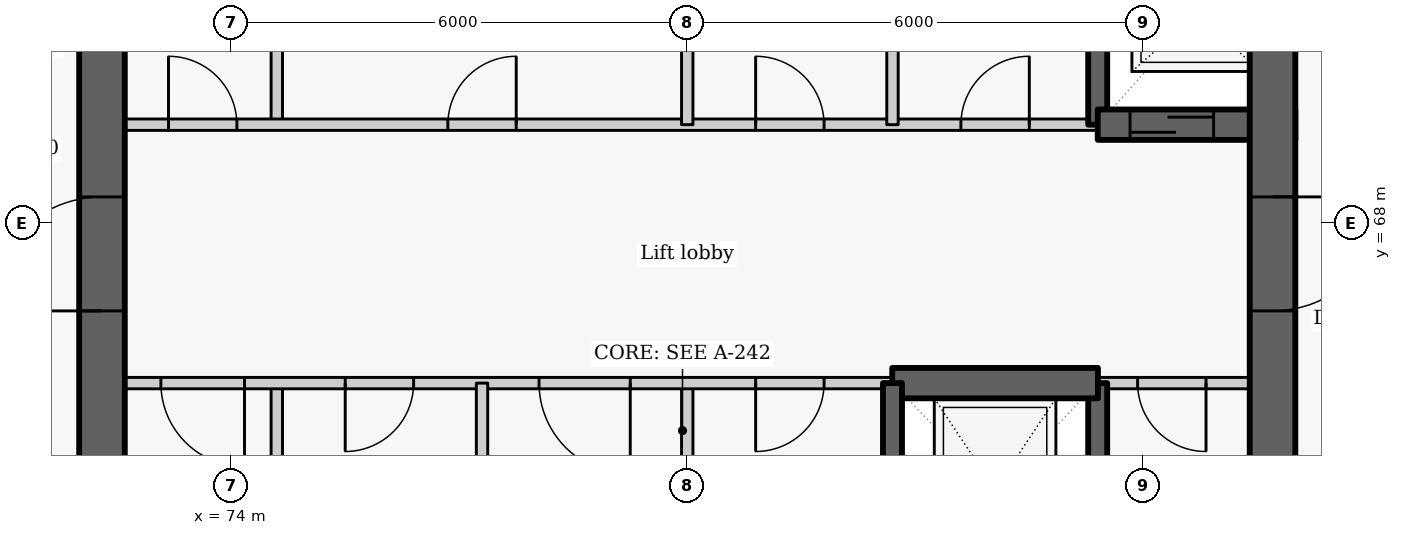
"""IFC4 building model, lengths in metres.
Left out: names, types, materials, properties, quantities, classifications, styles, units other than length and angle.
Written with IfcOpenShell. Run it as: python <this file> out.ifc"""

import sys

from ifc_helpers import new_model, si_unit, direction, frame, frame_2d, origin, place, context, subcontext, project, spatial, rectangle, extrude, element, fill, save


model = new_model("IFC4")
c1 = context("Model", 3, precision=1e-05, world=origin(), true_north=direction((0.0, 1.0)))
c2 = subcontext(c1, "Body", "Model", "MODEL_VIEW")
j1 = project(units=[si_unit("LENGTHUNIT", "METRE"), si_unit("PLANEANGLEUNIT", "RADIAN")], contexts=[c1])
p1 = place(None, origin())
s1 = spatial("IfcSite", under=j1, at=p1, CompositionType="ELEMENT")
p2 = place(p1, origin())
s2 = spatial("IfcBuilding", under=s1, at=p2, CompositionType="ELEMENT")
p3 = place(p2, frame((0.0, 0.0, 249.3)))
s3 = spatial("IfcBuildingStorey", under=s2, at=p3, CompositionType="ELEMENT", Elevation=249.3)
p4 = place(p3, frame((74.6, 63.1, 0.0), z_axis=(0.0, 0.0, 1.0), x_axis=(0.0, 1.0, 0.0)))
e1 = element("IfcWall", 1, at=p4, inside=s3, PredefinedType="PARTITIONING", context=c2, shape_type="SweptSolid", body=[
    extrude(rectangle(XDim=2.8, YDim=0.15, at=frame_2d((1.4, 0.0))), origin(), (0.0, 0.0, 1.0), 3.025),
])
p5 = place(p3, frame((74.6, 69.3, 0.0), z_axis=(0.0, 0.0, 1.0), x_axis=(0.0, 1.0, 0.0)))
e2 = element("IfcWall", 2, at=p5, inside=s3, PredefinedType="PARTITIONING", context=c2, shape_type="SweptSolid", body=[
    extrude(rectangle(XDim=2.9, YDim=0.15, at=frame_2d((1.45, 0.0))), origin(), (0.0, 0.0, 1.0), 3.025),
])
p6 = place(p3, frame((72.0, 69.3, 0.0), z_axis=(0.0, 0.0, 1.0), x_axis=(1.0, 0.0, 0.0)))
e3 = element("IfcWall", 3, at=p6, inside=s3, PredefinedType="PARTITIONING", context=c2, shape_type="SweptSolid", body=[
    extrude(rectangle(XDim=13.4, YDim=0.15, at=frame_2d((6.7, 0.0))), origin(), (0.0, 0.0, 1.0), 3.025),
])
p7 = place(p6, frame((1.175, 0.0, 0.0)))
e4 = element("IfcOpeningElement", 4, at=p7, cuts=e3, PredefinedType="OPENING", context=c2, shape_type="SweptSolid", body=[
    extrude(rectangle(XDim=0.9, YDim=2.1, at=frame_2d((0.45, 1.05))), frame((0.0, 0.085, 0.0), z_axis=(0.0, -1.0, 0.0), x_axis=(1.0, 0.0, 0.0)), (0.0, 0.0, 1.0), 0.17),
])
p8 = place(p6, frame((4.85, 0.0, 0.0)))
e5 = element("IfcOpeningElement", 5, at=p8, cuts=e3, PredefinedType="OPENING", context=c2, shape_type="SweptSolid", body=[
    extrude(rectangle(XDim=0.9, YDim=2.1, at=frame_2d((0.45, 1.05))), frame((0.0, 0.085, 0.0), z_axis=(0.0, -1.0, 0.0), x_axis=(1.0, 0.0, 0.0)), (0.0, 0.0, 1.0), 0.17),
])
p9 = place(p6, frame((8.9, 0.0, 0.0)))
e6 = element("IfcOpeningElement", 6, at=p9, cuts=e3, PredefinedType="OPENING", context=c2, shape_type="SweptSolid", body=[
    extrude(rectangle(XDim=0.9, YDim=2.1, at=frame_2d((0.45, 1.05))), frame((0.0, 0.085, 0.0), z_axis=(0.0, -1.0, 0.0), x_axis=(1.0, 0.0, 0.0)), (0.0, 0.0, 1.0), 0.17),
])
p10 = place(p6, frame((11.6, 0.0, 0.0)))
e7 = element("IfcOpeningElement", 7, at=p10, cuts=e3, PredefinedType="OPENING", context=c2, shape_type="SweptSolid", body=[
    extrude(rectangle(XDim=0.9, YDim=2.1, at=frame_2d((0.45, 1.05))), frame((0.0, 0.085, 0.0), z_axis=(0.0, -1.0, 0.0), x_axis=(1.0, 0.0, 0.0)), (0.0, 0.0, 1.0), 0.17),
])
p11 = place(p3, frame((72.3, 63.1, -0.275), z_axis=(0.0, 0.0, 1.0), x_axis=(0.0, 1.0, 0.0)))
e8 = element("IfcWall", 8, at=p11, inside=s3, PredefinedType="SHEAR", context=c2, shape_type="SweptSolid", body=[
    extrude(rectangle(XDim=9.1, YDim=0.6, at=frame_2d((4.55, 0.0))), origin(), (0.0, 0.0, 1.0), 3.3),
])
p12 = place(p11, frame((3.75, 0.0, 0.275)))
e9 = element("IfcOpeningElement", 9, at=p12, cuts=e8, PredefinedType="OPENING", context=c2, shape_type="SweptSolid", body=[
    extrude(rectangle(XDim=1.5, YDim=2.1, at=frame_2d((0.75, 1.05))), frame((0.0, 0.31, 0.0), z_axis=(0.0, -1.0, 0.0), x_axis=(1.0, 0.0, 0.0)), (0.0, 0.0, 1.0), 0.62),
])
p13 = place(p3, frame((85.4, 63.1, -0.275), z_axis=(0.0, 0.0, 1.0), x_axis=(0.0, 1.0, 0.0)))
e10 = element("IfcWall", 10, at=p13, inside=s3, PredefinedType="SHEAR", context=c2, shape_type="SweptSolid", body=[
    extrude(rectangle(XDim=2.8, YDim=0.25, at=frame_2d((1.4, 0.0))), origin(), (0.0, 0.0, 1.0), 3.3),
])
p14 = place(p3, frame((85.4, 69.3, -0.275), z_axis=(0.0, 0.0, 1.0), x_axis=(0.0, 1.0, 0.0)))
e11 = element("IfcWall", 11, at=p14, inside=s3, PredefinedType="SHEAR", context=c2, shape_type="SweptSolid", body=[
    extrude(rectangle(XDim=2.9, YDim=0.25, at=frame_2d((1.45, 0.0))), origin(), (0.0, 0.0, 1.0), 3.3),
])
p15 = place(p3, frame((85.4, 69.3, -0.275), z_axis=(0.0, 0.0, 1.0), x_axis=(1.0, 0.0, 0.0)))
e12 = element("IfcWall", 12, at=p15, inside=s3, PredefinedType="SHEAR", context=c2, shape_type="SweptSolid", body=[
    extrude(rectangle(XDim=2.6, YDim=0.4, at=frame_2d((1.3, 0.0))), origin(), (0.0, 0.0, 1.0), 3.3),
])
p16 = place(p15, frame((0.425, 0.0, 0.275)))
e13 = element("IfcOpeningElement", 13, at=p16, cuts=e12, PredefinedType="OPENING", context=c2, shape_type="SweptSolid", body=[
    extrude(rectangle(XDim=1.1, YDim=2.1, at=frame_2d((0.55, 1.05))), frame((0.0, 0.21, 0.0), z_axis=(0.0, -1.0, 0.0), x_axis=(1.0, 0.0, 0.0)), (0.0, 0.0, 1.0), 0.42),
])
p17 = place(p3, frame((87.7, 72.2, -0.275), z_axis=(0.0, 0.0, 1.0), x_axis=(0.0, -1.0, 0.0)))
e14 = element("IfcWall", 14, at=p17, inside=s3, PredefinedType="SHEAR", context=c2, shape_type="SweptSolid", body=[
    extrude(rectangle(XDim=14.25, YDim=0.6, at=frame_2d((7.125, 0.0))), origin(), (0.0, 0.0, 1.0), 3.3),
])
p18 = place(p17, frame((3.85, 0.0, 0.275)))
e15 = element("IfcOpeningElement", 15, at=p18, cuts=e14, PredefinedType="OPENING", context=c2, shape_type="SweptSolid", body=[
    extrude(rectangle(XDim=1.5, YDim=2.1, at=frame_2d((0.75, 1.05))), frame((0.0, 0.31, 0.0), z_axis=(0.0, -1.0, 0.0), x_axis=(1.0, 0.0, 0.0)), (0.0, 0.0, 1.0), 0.62),
])
p19 = place(p17, frame((11.125, 0.0, 0.275)))
e16 = element("IfcOpeningElement", 16, at=p19, cuts=e14, PredefinedType="OPENING", context=c2, shape_type="SweptSolid", body=[
    extrude(rectangle(XDim=1.1, YDim=2.1, at=frame_2d((0.55, 1.05))), frame((0.0, 0.31, 0.0), z_axis=(0.0, -1.0, 0.0), x_axis=(1.0, 0.0, 0.0)), (0.0, 0.0, 1.0), 0.62),
])
p20 = place(p3, frame((80.0, 63.1, 0.0), z_axis=(0.0, 0.0, 1.0), x_axis=(0.0, 1.0, 0.0)))
e17 = element("IfcWall", 17, at=p20, inside=s3, PredefinedType="PARTITIONING", context=c2, shape_type="SweptSolid", body=[
    extrude(rectangle(XDim=2.8, YDim=0.15, at=frame_2d((1.4, 0.0))), origin(), (0.0, 0.0, 1.0), 3.025),
])
for number, where, z_axis, x_axis in (
    (18, (80.0, 69.3, 0.0), (0.0, 0.0, 1.0), (0.0, 1.0, 0.0)),
    (19, (82.7, 69.3, 0.0), (0.0, 0.0, 1.0), (0.0, 1.0, 0.0)),
):
    element("IfcWall", number, at=place(p3, frame(where, z_axis=z_axis, x_axis=x_axis)), inside=s3, PredefinedType="PARTITIONING", context=c2, shape_type="SweptSolid", body=[
        extrude(rectangle(XDim=2.9, YDim=0.15, at=frame_2d((1.45, 0.0))), origin(), (0.0, 0.0, 1.0), 3.025),
    ])
p21 = place(p3, frame((82.703, 65.9, 0.0), z_axis=(0.0, 0.0, 1.0), x_axis=(-1.0, 0.0, 0.0)))
e20 = element("IfcWall", 20, at=p21, inside=s3, PredefinedType="PARTITIONING", context=c2, shape_type="SweptSolid", body=[
    extrude(rectangle(XDim=10.703, YDim=0.15, at=frame_2d((5.352, 0.0))), origin(), (0.0, 0.0, 1.0), 3.025),
])
p22 = place(p21, frame((8.528, 0.0, 0.0)))
e21 = element("IfcOpeningElement", 21, at=p22, cuts=e20, PredefinedType="OPENING", context=c2, shape_type="SweptSolid", body=[
    extrude(rectangle(XDim=1.1, YDim=2.1, at=frame_2d((0.55, 1.05))), frame((0.0, 0.085, 0.0), z_axis=(0.0, -1.0, 0.0), x_axis=(1.0, 0.0, 0.0)), (0.0, 0.0, 1.0), 0.17),
])
p23 = place(p21, frame((6.303, 0.0, 0.0)))
e22 = element("IfcOpeningElement", 22, at=p23, cuts=e20, PredefinedType="OPENING", context=c2, shape_type="SweptSolid", body=[
    extrude(rectangle(XDim=0.9, YDim=2.1, at=frame_2d((0.45, 1.05))), frame((0.0, 0.085, 0.0), z_axis=(0.0, -1.0, 0.0), x_axis=(1.0, 0.0, 0.0)), (0.0, 0.0, 1.0), 0.17),
])
p24 = place(p21, frame((3.453, 0.0, 0.0)))
e23 = element("IfcOpeningElement", 23, at=p24, cuts=e20, PredefinedType="OPENING", context=c2, shape_type="SweptSolid", body=[
    extrude(rectangle(XDim=1.2, YDim=2.1, at=frame_2d((0.6, 1.05))), frame((0.0, 0.085, 0.0), z_axis=(0.0, -1.0, 0.0), x_axis=(1.0, 0.0, 0.0)), (0.0, 0.0, 1.0), 0.17),
])
p25 = place(p21, frame((0.903, 0.0, 0.0)))
e24 = element("IfcOpeningElement", 24, at=p25, cuts=e20, PredefinedType="OPENING", context=c2, shape_type="SweptSolid", body=[
    extrude(rectangle(XDim=0.9, YDim=2.1, at=frame_2d((0.45, 1.05))), frame((0.0, 0.085, 0.0), z_axis=(0.0, -1.0, 0.0), x_axis=(1.0, 0.0, 0.0)), (0.0, 0.0, 1.0), 0.17),
])
p26 = place(p3, frame((88.0, 65.9, 0.0), z_axis=(0.0, 0.0, 1.0), x_axis=(-1.0, 0.0, 0.0)))
e25 = element("IfcWall", 25, at=p26, inside=s3, PredefinedType="PARTITIONING", context=c2, shape_type="SweptSolid", body=[
    extrude(rectangle(XDim=2.603, YDim=0.15, at=frame_2d((1.302, 0.0))), origin(), (0.0, 0.0, 1.0), 3.025),
])
p27 = place(p26, frame((1.175, 0.0, 0.0)))
e26 = element("IfcOpeningElement", 26, at=p27, cuts=e25, PredefinedType="OPENING", context=c2, shape_type="SweptSolid", body=[
    extrude(rectangle(XDim=0.9, YDim=2.1, at=frame_2d((0.45, 1.05))), frame((0.0, 0.085, 0.0), z_axis=(0.0, -1.0, 0.0), x_axis=(1.0, 0.0, 0.0)), (0.0, 0.0, 1.0), 0.17),
])
p28 = place(p3, frame((82.697, 65.9, -0.275), z_axis=(0.0, 0.0, 1.0), x_axis=(1.0, 0.0, 0.0)))
e27 = element("IfcWall", 27, at=p28, inside=s3, PredefinedType="SHEAR", context=c2, shape_type="SweptSolid", body=[
    extrude(rectangle(XDim=2.706, YDim=0.4, at=frame_2d((1.353, 0.0))), origin(), (0.0, 0.0, 1.0), 3.3),
])
p29 = place(p3, frame((77.3, 63.1, 0.0), z_axis=(0.0, 0.0, 1.0), x_axis=(0.0, 1.0, 0.0)))
e28 = element("IfcWall", 28, at=p29, inside=s3, PredefinedType="PARTITIONING", context=c2, shape_type="SweptSolid", body=[
    extrude(rectangle(XDim=2.8, YDim=0.15, at=frame_2d((1.4, 0.0))), origin(), (0.0, 0.0, 1.0), 3.025),
])
p30 = place(p3, frame((82.7, 63.1, -0.275), z_axis=(0.0, 0.0, 1.0), x_axis=(0.0, 1.0, 0.0)))
e29 = element("IfcWall", 29, at=p30, inside=s3, PredefinedType="SHEAR", context=c2, shape_type="SweptSolid", body=[
    extrude(rectangle(XDim=2.8, YDim=0.25, at=frame_2d((1.4, 0.0))), origin(), (0.0, 0.0, 1.0), 3.3),
])
p31 = place(p7, origin())
e30 = element("IfcDoor", 30, at=p31, inside=s3, OperationType="SINGLE_SWING_LEFT", PredefinedType="DOOR", context=c2, shape_type="SweptSolid", body=[
    extrude(rectangle(XDim=0.9, YDim=2.1, at=frame_2d((0.45, 1.05))), frame((0.0, 0.025, 0.0), z_axis=(0.0, -1.0, 0.0), x_axis=(1.0, 0.0, 0.0)), (0.0, 0.0, 1.0), 0.05),
])
fill(e4, e30)
p32 = place(p16, origin())
e31 = element("IfcDoor", 31, at=p32, inside=s3, OperationType="SLIDING_TO_LEFT", PredefinedType="DOOR", context=c2, shape_type="SweptSolid", body=[
    extrude(rectangle(XDim=1.1, YDim=2.1, at=frame_2d((0.55, 1.05))), frame((0.0, 0.025, 0.0), z_axis=(0.0, -1.0, 0.0), x_axis=(1.0, 0.0, 0.0)), (0.0, 0.0, 1.0), 0.05),
])
fill(e13, e31)
p33 = place(p8, origin())
e32 = element("IfcDoor", 32, at=p33, inside=s3, OperationType="SINGLE_SWING_RIGHT", PredefinedType="DOOR", context=c2, shape_type="SweptSolid", body=[
    extrude(rectangle(XDim=0.9, YDim=2.1, at=frame_2d((0.45, 1.05))), frame((0.0, 0.025, 0.0), z_axis=(0.0, -1.0, 0.0), x_axis=(1.0, 0.0, 0.0)), (0.0, 0.0, 1.0), 0.05),
])
fill(e5, e32)
p34 = place(p9, origin())
e33 = element("IfcDoor", 33, at=p34, inside=s3, OperationType="SINGLE_SWING_LEFT", PredefinedType="DOOR", context=c2, shape_type="SweptSolid", body=[
    extrude(rectangle(XDim=0.9, YDim=2.1, at=frame_2d((0.45, 1.05))), frame((0.0, 0.025, 0.0), z_axis=(0.0, -1.0, 0.0), x_axis=(1.0, 0.0, 0.0)), (0.0, 0.0, 1.0), 0.05),
])
fill(e6, e33)
p35 = place(p10, origin())
e34 = element("IfcDoor", 34, at=p35, inside=s3, OperationType="SINGLE_SWING_RIGHT", PredefinedType="DOOR", context=c2, shape_type="SweptSolid", body=[
    extrude(rectangle(XDim=0.9, YDim=2.1, at=frame_2d((0.45, 1.05))), frame((0.0, 0.025, 0.0), z_axis=(0.0, -1.0, 0.0), x_axis=(1.0, 0.0, 0.0)), (0.0, 0.0, 1.0), 0.05),
])
fill(e7, e34)
p36 = place(p22, origin())
e35 = element("IfcDoor", 35, at=p36, inside=s3, OperationType="SINGLE_SWING_LEFT", PredefinedType="DOOR", context=c2, shape_type="SweptSolid", body=[
    extrude(rectangle(XDim=1.1, YDim=2.1, at=frame_2d((0.55, 1.05))), frame((0.0, 0.025, 0.0), z_axis=(0.0, -1.0, 0.0), x_axis=(1.0, 0.0, 0.0)), (0.0, 0.0, 1.0), 0.05),
])
fill(e21, e35)
p37 = place(p23, origin())
e36 = element("IfcDoor", 36, at=p37, inside=s3, OperationType="SINGLE_SWING_RIGHT", PredefinedType="DOOR", context=c2, shape_type="SweptSolid", body=[
    extrude(rectangle(XDim=0.9, YDim=2.1, at=frame_2d((0.45, 1.05))), frame((0.0, 0.025, 0.0), z_axis=(0.0, -1.0, 0.0), x_axis=(1.0, 0.0, 0.0)), (0.0, 0.0, 1.0), 0.05),
])
fill(e22, e36)
p38 = place(p24, origin())
e37 = element("IfcDoor", 37, at=p38, inside=s3, OperationType="DOUBLE_DOOR_SINGLE_SWING", PredefinedType="DOOR", context=c2, shape_type="SweptSolid", body=[
    extrude(rectangle(XDim=1.2, YDim=2.1, at=frame_2d((0.6, 1.05))), frame((0.0, 0.025, 0.0), z_axis=(0.0, -1.0, 0.0), x_axis=(1.0, 0.0, 0.0)), (0.0, 0.0, 1.0), 0.05),
])
fill(e23, e37)
p39 = place(p25, origin())
e38 = element("IfcDoor", 38, at=p39, inside=s3, OperationType="SINGLE_SWING_RIGHT", PredefinedType="DOOR", context=c2, shape_type="SweptSolid", body=[
    extrude(rectangle(XDim=0.9, YDim=2.1, at=frame_2d((0.45, 1.05))), frame((0.0, 0.025, 0.0), z_axis=(0.0, -1.0, 0.0), x_axis=(1.0, 0.0, 0.0)), (0.0, 0.0, 1.0), 0.05),
])
fill(e24, e38)
p40 = place(p27, origin())
e39 = element("IfcDoor", 39, at=p40, inside=s3, OperationType="SINGLE_SWING_LEFT", PredefinedType="DOOR", context=c2, shape_type="SweptSolid", body=[
    extrude(rectangle(XDim=0.9, YDim=2.1, at=frame_2d((0.45, 1.05))), frame((0.0, 0.025, 0.0), z_axis=(0.0, -1.0, 0.0), x_axis=(1.0, 0.0, 0.0)), (0.0, 0.0, 1.0), 0.05),
])
fill(e26, e39)
p41 = place(p18, origin())
e40 = element("IfcDoor", 40, at=p41, inside=s3, OperationType="DOUBLE_DOOR_SINGLE_SWING", PredefinedType="DOOR", context=c2, shape_type="SweptSolid", body=[
    extrude(rectangle(XDim=1.5, YDim=2.1, at=frame_2d((0.75, 1.05))), frame((0.0, 0.025, 0.0), z_axis=(0.0, -1.0, 0.0), x_axis=(1.0, 0.0, 0.0)), (0.0, 0.0, 1.0), 0.05),
])
fill(e15, e40)
p42 = place(p12, origin())
e41 = element("IfcDoor", 41, at=p42, inside=s3, OperationType="DOUBLE_DOOR_SINGLE_SWING", PredefinedType="DOOR", context=c2, shape_type="SweptSolid", body=[
    extrude(rectangle(XDim=1.5, YDim=2.1, at=frame_2d((0.75, 1.05))), frame((0.0, 0.025, 0.0), z_axis=(0.0, -1.0, 0.0), x_axis=(1.0, 0.0, 0.0)), (0.0, 0.0, 1.0), 0.05),
])
fill(e9, e41)
save(model, sys.argv[1])
